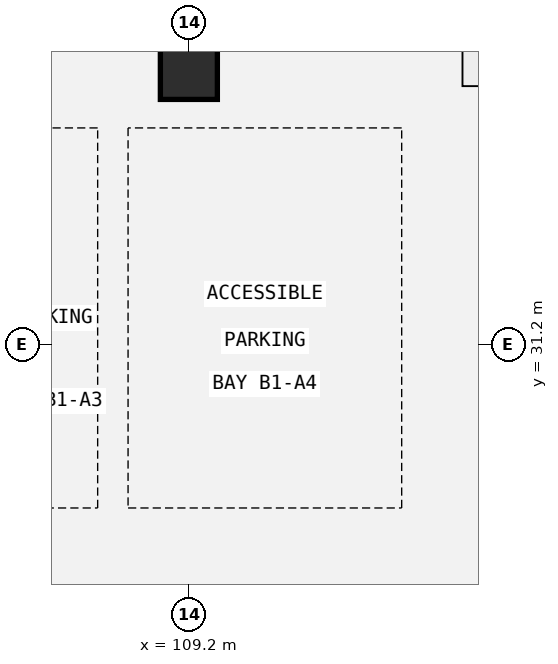
"""IFC4 building model, lengths in metres.
Left out: names, types, materials, properties, quantities, classifications, styles, units other than length and angle.
Written with IfcOpenShell. Run it as: python <this file> out.ifc"""

import sys

from ifc_helpers import new_model, si_unit, direction, frame, origin, origin_2d, place, context, subcontext, project, spatial, rectangle, extrude, element, save


model = new_model("IFC4")
c1 = context("Model", 3, precision=1e-05, world=origin(), true_north=direction((0.0, 1.0)))
c2 = subcontext(c1, "Body", "Model", "MODEL_VIEW")
j1 = project(units=[si_unit("LENGTHUNIT", "METRE"), si_unit("PLANEANGLEUNIT", "RADIAN")], contexts=[c1])
p1 = place(None, origin())
s1 = spatial("IfcSite", under=j1, at=p1, CompositionType="ELEMENT")
p2 = place(p1, origin())
s2 = spatial("IfcBuilding", under=s1, at=p2, CompositionType="ELEMENT")
p3 = place(p2, frame((0.0, 0.0, -4.5)))
s3 = spatial("IfcBuildingStorey", under=s2, at=p3, CompositionType="ELEMENT", Elevation=-4.5)
p4 = place(p3, frame((109.2, 34.8, 0.0), z_axis=(0.0, 0.0, 1.0), x_axis=(1.0, 0.0, 0.0)))
e1 = element("IfcColumn", 1, at=p4, inside=s3, PredefinedType="COLUMN", context=c2, shape_type="SweptSolid", body=[
    extrude(rectangle(XDim=0.75, YDim=0.75, at=origin_2d()), origin(), (0.0, 0.0, 1.0), 4.5),
])
save(model, sys.argv[1])
